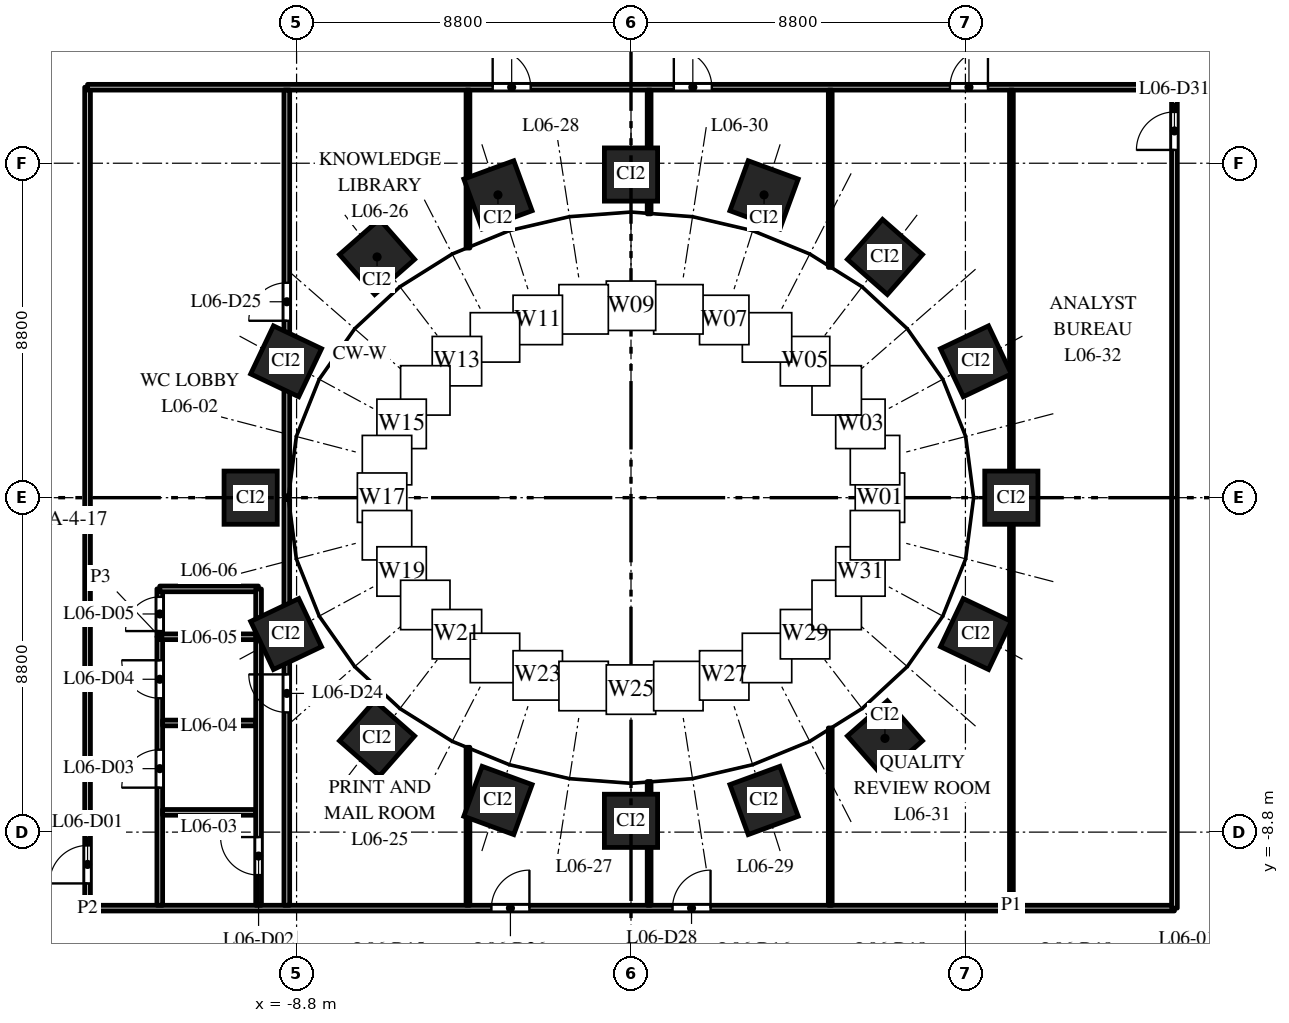
"""IFC4 building model, lengths in metres.
Left out: names, types, materials, properties, quantities, classifications, styles, units other than length and angle.
Written with IfcOpenShell. Run it as: python <this file> out.ifc"""

import sys

from ifc_helpers import new_model, si_unit, direction, frame, frame_2d, origin, origin_2d, place, context, subcontext, project, spatial, rectangle, extrude, element, fill, save


model = new_model("IFC4")
c1 = context("Model", 3, precision=1e-05, world=origin(), true_north=direction((0.0, 1.0)))
c2 = subcontext(c1, "Body", "Model", "MODEL_VIEW")
j1 = project(units=[si_unit("LENGTHUNIT", "METRE"), si_unit("PLANEANGLEUNIT", "RADIAN")], contexts=[c1])
p1 = place(None, origin())
s1 = spatial("IfcSite", under=j1, at=p1, CompositionType="ELEMENT")
p2 = place(p1, origin())
s2 = spatial("IfcBuilding", under=s1, at=p2, CompositionType="ELEMENT")
p3 = place(p2, frame((0.0, 0.0, 34.5)))
s3 = spatial("IfcBuildingStorey", under=s2, at=p3, CompositionType="ELEMENT", Elevation=34.5)
for number, where, z_axis, x_axis in (
    (1, (10.008, 0.0, 0.0), (0.0, 0.0, 1.0), (0.0, 1.0, 0.0)),
    (2, (9.076, 3.588, 0.0), (0.0, 0.0, 1.0), (-0.429, 0.903, 0.0)),
    (3, (6.682, 6.334, 0.0), (0.0, 0.0, 1.0), (-0.751, 0.66, 0.0)),
    (4, (3.501, 7.967, 0.0), (0.0, 0.0, 1.0), (-0.939, 0.344, 0.0)),
    (5, (0.0, 8.503, 0.0), (0.0, 0.0, 1.0), (-1.0, 0.0, 0.0)),
    (6, (-3.501, 7.967, 0.0), (0.0, 0.0, 1.0), (-0.939, -0.344, 0.0)),
    (7, (-6.682, 6.334, 0.0), (0.0, 0.0, 1.0), (-0.751, -0.66, 0.0)),
    (8, (-9.076, 3.588, 0.0), (0.0, 0.0, 1.0), (-0.429, -0.903, 0.0)),
    (9, (-10.008, 0.0, 0.0), (0.0, 0.0, 1.0), (0.0, -1.0, 0.0)),
    (10, (-9.076, -3.588, 0.0), (0.0, 0.0, 1.0), (0.429, -0.903, 0.0)),
    (11, (-6.682, -6.334, 0.0), (0.0, 0.0, 1.0), (0.751, -0.66, 0.0)),
    (12, (-3.501, -7.967, 0.0), (0.0, 0.0, 1.0), (0.939, -0.344, 0.0)),
    (13, (0.0, -8.503, 0.0), (0.0, 0.0, 1.0), (1.0, 0.0, 0.0)),
    (14, (3.501, -7.967, 0.0), (0.0, 0.0, 1.0), (0.939, 0.344, 0.0)),
    (15, (6.682, -6.334, 0.0), (0.0, 0.0, 1.0), (0.751, 0.66, 0.0)),
    (16, (9.076, -3.588, 0.0), (0.0, 0.0, 1.0), (0.429, 0.903, 0.0)),
):
    element("IfcColumn", number, at=place(p3, frame(where, z_axis=z_axis, x_axis=x_axis)), inside=s3, PredefinedType="COLUMN", context=c2, shape_type="SweptSolid", body=[
        extrude(rectangle(XDim=1.4, YDim=1.4, at=origin_2d()), origin(), (0.0, 0.0, 1.0), 4.0),
    ])
p4 = place(p3, frame((-14.3, -10.8, 0.0), z_axis=(0.0, 0.0, 1.0), x_axis=(0.0, 1.0, 0.0)))
e17 = element("IfcWall", 17, at=p4, inside=s3, PredefinedType="PARTITIONING", context=c2, shape_type="SweptSolid", body=[
    extrude(rectangle(XDim=21.6, YDim=0.15, at=frame_2d((10.8, 0.0))), origin(), (0.0, 0.0, 1.0), 2.75),
])
p5 = place(p4, frame((0.65, 0.0, 0.0)))
e18 = element("IfcOpeningElement", 18, at=p5, cuts=e17, PredefinedType="OPENING", context=c2, shape_type="SweptSolid", body=[
    extrude(rectangle(XDim=1.0, YDim=2.1, at=frame_2d((0.5, 1.05))), frame((0.0, 0.085, 0.0), z_axis=(0.0, -1.0, 0.0), x_axis=(1.0, 0.0, 0.0)), (0.0, 0.0, 1.0), 0.17),
])
p6 = place(p3, frame((-14.3, -10.8, 0.0), z_axis=(0.0, 0.0, 1.0), x_axis=(1.0, 0.0, 0.0)))
e19 = element("IfcWall", 19, at=p6, inside=s3, PredefinedType="PARTITIONING", context=c2, shape_type="SweptSolid", body=[
    extrude(rectangle(XDim=28.6, YDim=0.15, at=frame_2d((14.3, 0.0))), origin(), (0.0, 0.0, 1.0), 2.85),
])
p7 = place(p6, frame((10.627, 0.0, 0.0)))
e20 = element("IfcOpeningElement", 20, at=p7, cuts=e19, PredefinedType="OPENING", context=c2, shape_type="SweptSolid", body=[
    extrude(rectangle(XDim=1.0, YDim=2.1, at=frame_2d((0.5, 1.05))), frame((0.0, 0.085, 0.0), z_axis=(0.0, -1.0, 0.0), x_axis=(1.0, 0.0, 0.0)), (0.0, 0.0, 1.0), 0.17),
])
p8 = place(p6, frame((15.393, 0.0, 0.0)))
e21 = element("IfcOpeningElement", 21, at=p8, cuts=e19, PredefinedType="OPENING", context=c2, shape_type="SweptSolid", body=[
    extrude(rectangle(XDim=1.0, YDim=2.1, at=frame_2d((0.5, 1.05))), frame((0.0, 0.085, 0.0), z_axis=(0.0, -1.0, 0.0), x_axis=(1.0, 0.0, 0.0)), (0.0, 0.0, 1.0), 0.17),
])
p9 = place(p3, frame((-14.3, 10.8, 0.0), z_axis=(0.0, 0.0, 1.0), x_axis=(1.0, 0.0, 0.0)))
e22 = element("IfcWall", 22, at=p9, inside=s3, PredefinedType="PARTITIONING", context=c2, shape_type="SweptSolid", body=[
    extrude(rectangle(XDim=28.6, YDim=0.15, at=frame_2d((14.3, 0.0))), origin(), (0.0, 0.0, 1.0), 2.85),
])
p10 = place(p9, frame((10.66, 0.0, 0.0)))
e23 = element("IfcOpeningElement", 23, at=p10, cuts=e22, PredefinedType="OPENING", context=c2, shape_type="SweptSolid", body=[
    extrude(rectangle(XDim=1.0, YDim=2.1, at=frame_2d((0.5, 1.05))), frame((0.0, 0.085, 0.0), z_axis=(0.0, -1.0, 0.0), x_axis=(1.0, 0.0, 0.0)), (0.0, 0.0, 1.0), 0.17),
])
p11 = place(p9, frame((15.427, 0.0, 0.0)))
e24 = element("IfcOpeningElement", 24, at=p11, cuts=e22, PredefinedType="OPENING", context=c2, shape_type="SweptSolid", body=[
    extrude(rectangle(XDim=1.0, YDim=2.1, at=frame_2d((0.5, 1.05))), frame((0.0, 0.085, 0.0), z_axis=(0.0, -1.0, 0.0), x_axis=(1.0, 0.0, 0.0)), (0.0, 0.0, 1.0), 0.17),
])
p12 = place(p9, frame((22.693, 0.0, 0.0)))
e25 = element("IfcOpeningElement", 25, at=p12, cuts=e22, PredefinedType="OPENING", context=c2, shape_type="SweptSolid", body=[
    extrude(rectangle(XDim=1.0, YDim=2.1, at=frame_2d((0.5, 1.05))), frame((0.0, 0.085, 0.0), z_axis=(0.0, -1.0, 0.0), x_axis=(1.0, 0.0, 0.0)), (0.0, 0.0, 1.0), 0.17),
])
p13 = place(p3, frame((-12.4, -10.725, 0.0), z_axis=(0.0, 0.0, 1.0), x_axis=(0.0, 1.0, 0.0)))
e26 = element("IfcWall", 26, at=p13, inside=s3, PredefinedType="PARTITIONING", context=c2, shape_type="SweptSolid", body=[
    extrude(rectangle(XDim=7.065, YDim=0.15, at=frame_2d((3.533, 0.0))), origin(), (0.0, 0.0, 1.0), 2.75),
])
p14 = place(p13, frame((3.095, 0.0, 0.0)))
e27 = element("IfcOpeningElement", 27, at=p14, cuts=e26, PredefinedType="OPENING", context=c2, shape_type="SweptSolid", body=[
    extrude(rectangle(XDim=1.0, YDim=2.1, at=frame_2d((0.5, 1.05))), frame((0.0, 0.085, 0.0), z_axis=(0.0, -1.0, 0.0), x_axis=(1.0, 0.0, 0.0)), (0.0, 0.0, 1.0), 0.17),
])
p15 = place(p13, frame((5.447, 0.0, 0.0)))
e28 = element("IfcOpeningElement", 28, at=p15, cuts=e26, PredefinedType="OPENING", context=c2, shape_type="SweptSolid", body=[
    extrude(rectangle(XDim=1.0, YDim=2.1, at=frame_2d((0.5, 1.05))), frame((0.0, 0.085, 0.0), z_axis=(0.0, -1.0, 0.0), x_axis=(1.0, 0.0, 0.0)), (0.0, 0.0, 1.0), 0.17),
])
p16 = place(p3, frame((-12.325, -8.28, 0.0), z_axis=(0.0, 0.0, 1.0), x_axis=(1.0, 0.0, 0.0)))
e29 = element("IfcWall", 29, at=p16, inside=s3, PredefinedType="PARTITIONING", context=c2, shape_type="SweptSolid", body=[
    extrude(rectangle(XDim=2.45, YDim=0.15, at=frame_2d((1.225, 0.0))), origin(), (0.0, 0.0, 1.0), 2.75),
])
p17 = place(p3, frame((-12.325, -5.928, 0.0), z_axis=(0.0, 0.0, 1.0), x_axis=(1.0, 0.0, 0.0)))
e30 = element("IfcWall", 30, at=p17, inside=s3, PredefinedType="PARTITIONING", context=c2, shape_type="SweptSolid", body=[
    extrude(rectangle(XDim=2.45, YDim=0.15, at=frame_2d((1.225, 0.0))), origin(), (0.0, 0.0, 1.0), 3.7),
])
p18 = place(p3, frame((-12.4, -3.66, 0.0), z_axis=(0.0, 0.0, 1.0), x_axis=(0.0, 1.0, 0.0)))
e31 = element("IfcWall", 31, at=p18, inside=s3, PredefinedType="PARTITIONING", context=c2, shape_type="SweptSolid", body=[
    extrude(rectangle(XDim=1.26, YDim=0.15, at=frame_2d((0.63, 0.0))), origin(), (0.0, 0.0, 1.0), 3.7),
])
p19 = place(p18, frame((0.15, 0.0, 0.0)))
e32 = element("IfcOpeningElement", 32, at=p19, cuts=e31, PredefinedType="OPENING", context=c2, shape_type="SweptSolid", body=[
    extrude(rectangle(XDim=0.9, YDim=2.1, at=frame_2d((0.45, 1.05))), frame((0.0, 0.085, 0.0), z_axis=(0.0, -1.0, 0.0), x_axis=(1.0, 0.0, 0.0)), (0.0, 0.0, 1.0), 0.17),
])
p20 = place(p3, frame((-12.4, -3.66, 0.0), z_axis=(0.0, 0.0, 1.0), x_axis=(1.0, 0.0, 0.0)))
e33 = element("IfcWall", 33, at=p20, inside=s3, PredefinedType="PARTITIONING", context=c2, shape_type="SweptSolid", body=[
    extrude(rectangle(XDim=2.6, YDim=0.15, at=frame_2d((1.3, 0.0))), origin(), (0.0, 0.0, 1.0), 3.7),
])
p21 = place(p3, frame((-12.4, -2.4, 0.0), z_axis=(0.0, 0.0, 1.0), x_axis=(1.0, 0.0, 0.0)))
e34 = element("IfcWall", 34, at=p21, inside=s3, PredefinedType="PARTITIONING", context=c2, shape_type="SweptSolid", body=[
    extrude(rectangle(XDim=2.596, YDim=0.15, at=frame_2d((1.298, 0.0))), origin(), (0.0, 0.0, 1.0), 3.7),
])
p22 = place(p3, frame((-9.8, -10.725, 0.0), z_axis=(0.0, 0.0, 1.0), x_axis=(0.0, 1.0, 0.0)))
e35 = element("IfcWall", 35, at=p22, inside=s3, PredefinedType="PARTITIONING", context=c2, shape_type="SweptSolid", body=[
    extrude(rectangle(XDim=7.065, YDim=0.15, at=frame_2d((3.533, 0.0))), origin(), (0.0, 0.0, 1.0), 2.75),
])
p23 = place(p22, frame((0.795, 0.0, 0.0)))
e36 = element("IfcOpeningElement", 36, at=p23, cuts=e35, PredefinedType="OPENING", context=c2, shape_type="SweptSolid", body=[
    extrude(rectangle(XDim=1.0, YDim=2.1, at=frame_2d((0.5, 1.05))), frame((0.0, 0.085, 0.0), z_axis=(0.0, -1.0, 0.0), x_axis=(1.0, 0.0, 0.0)), (0.0, 0.0, 1.0), 0.17),
])
p24 = place(p3, frame((-9.8, -3.66, 0.0), z_axis=(0.0, 0.0, 1.0), x_axis=(0.0, 1.0, 0.0)))
e37 = element("IfcWall", 37, at=p24, inside=s3, PredefinedType="PARTITIONING", context=c2, shape_type="SweptSolid", body=[
    extrude(rectangle(XDim=1.256, YDim=0.15, at=frame_2d((0.628, 0.0))), origin(), (0.0, 0.0, 1.0), 3.7),
])
p25 = place(p3, frame((-9.057, -10.725, 0.0), z_axis=(0.0, 0.0, 1.0), x_axis=(0.0, 1.0, 0.0)))
e38 = element("IfcWall", 38, at=p25, inside=s3, PredefinedType="PARTITIONING", context=c2, shape_type="SweptSolid", body=[
    extrude(rectangle(XDim=10.68, YDim=0.15, at=frame_2d((5.34, 0.0))), origin(), (0.0, 0.0, 1.0), 2.75),
])
p26 = place(p25, frame((5.075, 0.0, 0.0)))
e39 = element("IfcOpeningElement", 39, at=p26, cuts=e38, PredefinedType="OPENING", context=c2, shape_type="SweptSolid", body=[
    extrude(rectangle(XDim=1.0, YDim=2.1, at=frame_2d((0.5, 1.05))), frame((0.0, 0.085, 0.0), z_axis=(0.0, -1.0, 0.0), x_axis=(1.0, 0.0, 0.0)), (0.0, 0.0, 1.0), 0.17),
])
p27 = place(p3, frame((-9.057, 0.045, 0.0), z_axis=(0.0, 0.0, 1.0), x_axis=(0.0, 1.0, 0.0)))
e40 = element("IfcWall", 40, at=p27, inside=s3, PredefinedType="PARTITIONING", context=c2, shape_type="SweptSolid", body=[
    extrude(rectangle(XDim=10.68, YDim=0.15, at=frame_2d((5.34, 0.0))), origin(), (0.0, 0.0, 1.0), 2.75),
])
p28 = place(p27, frame((4.61, 0.0, 0.0)))
e41 = element("IfcOpeningElement", 41, at=p28, cuts=e40, PredefinedType="OPENING", context=c2, shape_type="SweptSolid", body=[
    extrude(rectangle(XDim=1.0, YDim=2.1, at=frame_2d((0.5, 1.05))), frame((0.0, 0.085, 0.0), z_axis=(0.0, -1.0, 0.0), x_axis=(1.0, 0.0, 0.0)), (0.0, 0.0, 1.0), 0.17),
])
for number, where, z_axis, x_axis in (
    (42, (-4.29, -10.725, 0.0), (0.0, 0.0, 1.0), (0.0, 1.0, 0.0)),
    (43, (-4.29, 6.568, 0.0), (0.0, 0.0, 1.0), (0.0, 1.0, 0.0)),
):
    element("IfcWall", number, at=place(p3, frame(where, z_axis=z_axis, x_axis=x_axis)), inside=s3, PredefinedType="PARTITIONING", context=c2, shape_type="SweptSolid", body=[
        extrude(rectangle(XDim=4.157, YDim=0.1, at=frame_2d((2.079, 0.0))), origin(), (0.0, 0.0, 1.0), 2.85),
    ])
for number, where, z_axis, x_axis in (
    (44, (0.477, -10.725, 0.0), (0.0, 0.0, 1.0), (0.0, 1.0, 0.0)),
    (45, (0.477, 7.468, 0.0), (0.0, 0.0, 1.0), (0.0, 1.0, 0.0)),
):
    element("IfcWall", number, at=place(p3, frame(where, z_axis=z_axis, x_axis=x_axis)), inside=s3, PredefinedType="PARTITIONING", context=c2, shape_type="SweptSolid", body=[
        extrude(rectangle(XDim=3.257, YDim=0.1, at=frame_2d((1.628, 0.0))), origin(), (0.0, 0.0, 1.0), 2.85),
    ])
for number, where, z_axis, x_axis in (
    (46, (5.243, -10.725, 0.0), (0.0, 0.0, 1.0), (0.0, 1.0, 0.0)),
    (47, (5.243, 6.059, 0.0), (0.0, 0.0, 1.0), (0.0, 1.0, 0.0)),
):
    element("IfcWall", number, at=place(p3, frame(where, z_axis=z_axis, x_axis=x_axis)), inside=s3, PredefinedType="PARTITIONING", context=c2, shape_type="SweptSolid", body=[
        extrude(rectangle(XDim=4.666, YDim=0.1, at=frame_2d((2.333, 0.0))), origin(), (0.0, 0.0, 1.0), 2.85),
    ])
p29 = place(p3, frame((10.01, -10.725, 0.0), z_axis=(0.0, 0.0, 1.0), x_axis=(0.0, 1.0, 0.0)))
e48 = element("IfcWall", 48, at=p29, inside=s3, PredefinedType="PARTITIONING", context=c2, shape_type="SweptSolid", body=[
    extrude(rectangle(XDim=21.45, YDim=0.1, at=frame_2d((10.725, 0.0))), origin(), (0.0, 0.0, 1.0), 2.75),
])
p30 = place(p3, frame((14.3, -10.8, 0.0), z_axis=(0.0, 0.0, 1.0), x_axis=(0.0, 1.0, 0.0)))
e49 = element("IfcWall", 49, at=p30, inside=s3, PredefinedType="PARTITIONING", context=c2, shape_type="SweptSolid", body=[
    extrude(rectangle(XDim=21.6, YDim=0.15, at=frame_2d((10.8, 0.0))), origin(), (0.0, 0.0, 1.0), 2.75),
])
p31 = place(p30, frame((19.95, 0.0, 0.0)))
e50 = element("IfcOpeningElement", 50, at=p31, cuts=e49, PredefinedType="OPENING", context=c2, shape_type="SweptSolid", body=[
    extrude(rectangle(XDim=1.0, YDim=2.1, at=frame_2d((0.5, 1.05))), frame((0.0, 0.085, 0.0), z_axis=(0.0, -1.0, 0.0), x_axis=(1.0, 0.0, 0.0)), (0.0, 0.0, 1.0), 0.17),
])
p32 = place(p5, origin())
e51 = element("IfcDoor", 51, at=p32, inside=s3, OperationType="SINGLE_SWING_LEFT", PredefinedType="DOOR", context=c2, shape_type="SweptSolid", body=[
    extrude(rectangle(XDim=1.0, YDim=2.1, at=frame_2d((0.5, 1.05))), frame((0.0, 0.025, 0.0), z_axis=(0.0, -1.0, 0.0), x_axis=(1.0, 0.0, 0.0)), (0.0, 0.0, 1.0), 0.05),
])
fill(e18, e51)
p33 = place(p23, origin())
e52 = element("IfcDoor", 52, at=p33, inside=s3, OperationType="SINGLE_SWING_RIGHT", PredefinedType="DOOR", context=c2, shape_type="SweptSolid", body=[
    extrude(rectangle(XDim=1.0, YDim=2.1, at=frame_2d((0.5, 1.05))), frame((0.0, 0.025, 0.0), z_axis=(0.0, -1.0, 0.0), x_axis=(1.0, 0.0, 0.0)), (0.0, 0.0, 1.0), 0.05),
])
fill(e36, e52)
p34 = place(p14, origin())
e53 = element("IfcDoor", 53, at=p34, inside=s3, OperationType="SINGLE_SWING_LEFT", PredefinedType="DOOR", context=c2, shape_type="SweptSolid", body=[
    extrude(rectangle(XDim=1.0, YDim=2.1, at=frame_2d((0.5, 1.05))), frame((0.0, 0.025, 0.0), z_axis=(0.0, -1.0, 0.0), x_axis=(1.0, 0.0, 0.0)), (0.0, 0.0, 1.0), 0.05),
])
fill(e27, e53)
p35 = place(p15, origin())
e54 = element("IfcDoor", 54, at=p35, inside=s3, OperationType="SINGLE_SWING_RIGHT", PredefinedType="DOOR", context=c2, shape_type="SweptSolid", body=[
    extrude(rectangle(XDim=1.0, YDim=2.1, at=frame_2d((0.5, 1.05))), frame((0.0, 0.025, 0.0), z_axis=(0.0, -1.0, 0.0), x_axis=(1.0, 0.0, 0.0)), (0.0, 0.0, 1.0), 0.05),
])
fill(e28, e54)
p36 = place(p19, origin())
e55 = element("IfcDoor", 55, at=p36, inside=s3, OperationType="SINGLE_SWING_LEFT", PredefinedType="DOOR", context=c2, shape_type="SweptSolid", body=[
    extrude(rectangle(XDim=0.9, YDim=2.1, at=frame_2d((0.45, 1.05))), frame((0.0, 0.025, 0.0), z_axis=(0.0, -1.0, 0.0), x_axis=(1.0, 0.0, 0.0)), (0.0, 0.0, 1.0), 0.05),
])
fill(e32, e55)
p37 = place(p26, origin())
e56 = element("IfcDoor", 56, at=p37, inside=s3, OperationType="SINGLE_SWING_RIGHT", PredefinedType="DOOR", context=c2, shape_type="SweptSolid", body=[
    extrude(rectangle(XDim=1.0, YDim=2.1, at=frame_2d((0.5, 1.05))), frame((0.0, 0.025, 0.0), z_axis=(0.0, -1.0, 0.0), x_axis=(1.0, 0.0, 0.0)), (0.0, 0.0, 1.0), 0.05),
])
fill(e39, e56)
p38 = place(p28, origin())
e57 = element("IfcDoor", 57, at=p38, inside=s3, OperationType="SINGLE_SWING_LEFT", PredefinedType="DOOR", context=c2, shape_type="SweptSolid", body=[
    extrude(rectangle(XDim=1.0, YDim=2.1, at=frame_2d((0.5, 1.05))), frame((0.0, 0.025, 0.0), z_axis=(0.0, -1.0, 0.0), x_axis=(1.0, 0.0, 0.0)), (0.0, 0.0, 1.0), 0.05),
])
fill(e41, e57)
p39 = place(p7, origin())
e58 = element("IfcDoor", 58, at=p39, inside=s3, OperationType="SINGLE_SWING_RIGHT", PredefinedType="DOOR", context=c2, shape_type="SweptSolid", body=[
    extrude(rectangle(XDim=1.0, YDim=2.1, at=frame_2d((0.5, 1.05))), frame((0.0, 0.025, 0.0), z_axis=(0.0, -1.0, 0.0), x_axis=(1.0, 0.0, 0.0)), (0.0, 0.0, 1.0), 0.05),
])
fill(e20, e58)
p40 = place(p10, origin())
e59 = element("IfcDoor", 59, at=p40, inside=s3, OperationType="SINGLE_SWING_LEFT", PredefinedType="DOOR", context=c2, shape_type="SweptSolid", body=[
    extrude(rectangle(XDim=1.0, YDim=2.1, at=frame_2d((0.5, 1.05))), frame((0.0, 0.025, 0.0), z_axis=(0.0, -1.0, 0.0), x_axis=(1.0, 0.0, 0.0)), (0.0, 0.0, 1.0), 0.05),
])
fill(e23, e59)
p41 = place(p8, origin())
e60 = element("IfcDoor", 60, at=p41, inside=s3, OperationType="SINGLE_SWING_RIGHT", PredefinedType="DOOR", context=c2, shape_type="SweptSolid", body=[
    extrude(rectangle(XDim=1.0, YDim=2.1, at=frame_2d((0.5, 1.05))), frame((0.0, 0.025, 0.0), z_axis=(0.0, -1.0, 0.0), x_axis=(1.0, 0.0, 0.0)), (0.0, 0.0, 1.0), 0.05),
])
fill(e21, e60)
p42 = place(p11, origin())
e61 = element("IfcDoor", 61, at=p42, inside=s3, OperationType="SINGLE_SWING_LEFT", PredefinedType="DOOR", context=c2, shape_type="SweptSolid", body=[
    extrude(rectangle(XDim=1.0, YDim=2.1, at=frame_2d((0.5, 1.05))), frame((0.0, 0.025, 0.0), z_axis=(0.0, -1.0, 0.0), x_axis=(1.0, 0.0, 0.0)), (0.0, 0.0, 1.0), 0.05),
])
fill(e24, e61)
p43 = place(p12, origin())
e62 = element("IfcDoor", 62, at=p43, inside=s3, OperationType="SINGLE_SWING_RIGHT", PredefinedType="DOOR", context=c2, shape_type="SweptSolid", body=[
    extrude(rectangle(XDim=1.0, YDim=2.1, at=frame_2d((0.5, 1.05))), frame((0.0, 0.025, 0.0), z_axis=(0.0, -1.0, 0.0), x_axis=(1.0, 0.0, 0.0)), (0.0, 0.0, 1.0), 0.05),
])
fill(e25, e62)
p44 = place(p31, origin())
e63 = element("IfcDoor", 63, at=p44, inside=s3, OperationType="SINGLE_SWING_LEFT", PredefinedType="DOOR", context=c2, shape_type="SweptSolid", body=[
    extrude(rectangle(XDim=1.0, YDim=2.1, at=frame_2d((0.5, 1.05))), frame((0.0, 0.025, 0.0), z_axis=(0.0, -1.0, 0.0), x_axis=(1.0, 0.0, 0.0)), (0.0, 0.0, 1.0), 0.05),
])
fill(e50, e63)
save(model, sys.argv[1])
